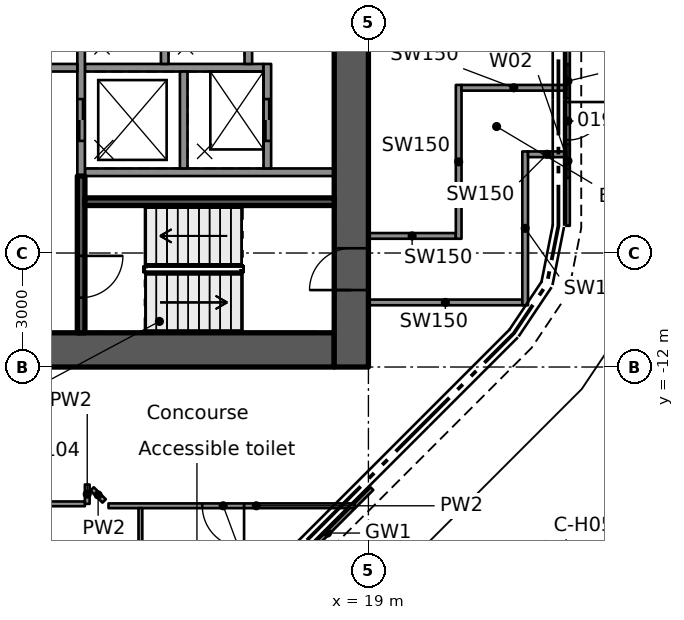
"""IFC4 building model, lengths in metres.
Left out: names, types, materials, properties, quantities, classifications, styles, units other than length and angle.
Written with IfcOpenShell. Run it as: python <this file> out.ifc"""

import sys

from ifc_helpers import new_model, si_unit, direction, frame, frame_2d, origin, place, context, subcontext, project, spatial, rectangle, extrude, element, fill, save


model = new_model("IFC4")
c1 = context("Model", 3, precision=1e-05, world=origin(), true_north=direction((0.0, 1.0)))
c2 = subcontext(c1, "Body", "Model", "MODEL_VIEW")
j1 = project(units=[si_unit("LENGTHUNIT", "METRE"), si_unit("PLANEANGLEUNIT", "RADIAN")], contexts=[c1])
p1 = place(None, origin())
s1 = spatial("IfcSite", under=j1, at=p1, CompositionType="ELEMENT")
p2 = place(p1, origin())
s2 = spatial("IfcBuilding", under=s1, at=p2, CompositionType="ELEMENT")
p3 = place(p2, origin())
s3 = spatial("IfcBuildingStorey", under=s2, at=p3, CompositionType="ELEMENT", Elevation=0.0)
p4 = place(p3, frame((8.9, -11.55, -0.5), z_axis=(0.0, 0.0, 1.0), x_axis=(1.0, 0.0, 0.0)))
e1 = element("IfcWall", 1, at=p4, inside=s3, PredefinedType="SHEAR", context=c2, shape_type="SweptSolid", body=[
    extrude(rectangle(XDim=9.2, YDim=0.9, at=frame_2d((4.6, 0.0))), origin(), (0.0, 0.0, 1.0), 11.0),
])
p5 = place(p3, frame((18.55, -12.0, -0.5), z_axis=(0.0, 0.0, 1.0), x_axis=(0.0, 1.0, 0.0)))
e2 = element("IfcWall", 2, at=p5, inside=s3, PredefinedType="SHEAR", context=c2, shape_type="SweptSolid", body=[
    extrude(rectangle(XDim=24.0, YDim=0.9, at=frame_2d((12.0, 0.0))), origin(), (0.0, 0.0, 1.0), 11.0),
])
p6 = place(p5, frame((12.1, 0.0, 0.5)))
e3 = element("IfcOpeningElement", 3, at=p6, cuts=e2, PredefinedType="OPENING", context=c2, shape_type="SweptSolid", body=[
    extrude(rectangle(XDim=1.8, YDim=2.1, at=frame_2d((0.9, 1.05))), frame((0.0, 0.46, 0.0), z_axis=(0.0, -1.0, 0.0), x_axis=(1.0, 0.0, 0.0)), (0.0, 0.0, 1.0), 0.92),
])
p7 = place(p5, frame((2.025, 0.0, 0.5)))
e4 = element("IfcOpeningElement", 4, at=p7, cuts=e2, PredefinedType="OPENING", context=c2, shape_type="SweptSolid", body=[
    extrude(rectangle(XDim=1.1, YDim=2.1, at=frame_2d((0.55, 1.05))), frame((0.0, 0.46, 0.0), z_axis=(0.0, -1.0, 0.0), x_axis=(1.0, 0.0, 0.0)), (0.0, 0.0, 1.0), 0.92),
])
p8 = place(p3, frame((11.54, -6.875, 0.0), z_axis=(0.0, 0.0, 1.0), x_axis=(1.0, 0.0, 0.0)))
e5 = element("IfcWall", 5, at=p8, inside=s3, PredefinedType="SOLIDWALL", context=c2, shape_type="SweptSolid", body=[
    extrude(rectangle(XDim=6.56, YDim=0.2, at=frame_2d((3.28, 0.0))), origin(), (0.0, 0.0, 1.0), 10.09),
])
p9 = place(p3, frame((11.54, -4.125, 0.0), z_axis=(0.0, 0.0, 1.0), x_axis=(1.0, 0.0, 0.0)))
e6 = element("IfcWall", 6, at=p9, inside=s3, PredefinedType="SOLIDWALL", context=c2, shape_type="SweptSolid", body=[
    extrude(rectangle(XDim=4.7, YDim=0.2, at=frame_2d((2.35, 0.0))), origin(), (0.0, 0.0, 1.0), 10.09),
])
p10 = place(p3, frame((11.44, 6.975, 0.0), z_axis=(0.0, 0.0, 1.0), x_axis=(0.0, -1.0, 0.0)))
e7 = element("IfcWall", 7, at=p10, inside=s3, PredefinedType="SOLIDWALL", context=c2, shape_type="SweptSolid", body=[
    extrude(rectangle(XDim=13.95, YDim=0.2, at=frame_2d((6.975, 0.0))), origin(), (0.0, 0.0, 1.0), 10.09),
])
p11 = place(p10, frame((0.925, 0.0, 0.0)))
e8 = element("IfcOpeningElement", 8, at=p11, cuts=e7, PredefinedType="OPENING", context=c2, shape_type="SweptSolid", body=[
    extrude(rectangle(XDim=1.1, YDim=2.1, at=frame_2d((0.55, 1.05))), frame((0.0, 0.11, 0.0), z_axis=(0.0, -1.0, 0.0), x_axis=(1.0, 0.0, 0.0)), (0.0, 0.0, 1.0), 0.22),
])
p12 = place(p10, frame((3.675, 0.0, 0.0)))
e9 = element("IfcOpeningElement", 9, at=p12, cuts=e7, PredefinedType="OPENING", context=c2, shape_type="SweptSolid", body=[
    extrude(rectangle(XDim=1.1, YDim=2.1, at=frame_2d((0.55, 1.05))), frame((0.0, 0.11, 0.0), z_axis=(0.0, -1.0, 0.0), x_axis=(1.0, 0.0, 0.0)), (0.0, 0.0, 1.0), 0.22),
])
p13 = place(p10, frame((6.425, 0.0, 0.0)))
e10 = element("IfcOpeningElement", 10, at=p13, cuts=e7, PredefinedType="OPENING", context=c2, shape_type="SweptSolid", body=[
    extrude(rectangle(XDim=1.1, YDim=2.1, at=frame_2d((0.55, 1.05))), frame((0.0, 0.11, 0.0), z_axis=(0.0, -1.0, 0.0), x_axis=(1.0, 0.0, 0.0)), (0.0, 0.0, 1.0), 0.22),
])
p14 = place(p10, frame((9.175, 0.0, 0.0)))
e11 = element("IfcOpeningElement", 11, at=p14, cuts=e7, PredefinedType="OPENING", context=c2, shape_type="SweptSolid", body=[
    extrude(rectangle(XDim=1.1, YDim=2.1, at=frame_2d((0.55, 1.05))), frame((0.0, 0.11, 0.0), z_axis=(0.0, -1.0, 0.0), x_axis=(1.0, 0.0, 0.0)), (0.0, 0.0, 1.0), 0.22),
])
p15 = place(p10, frame((11.925, 0.0, 0.0)))
e12 = element("IfcOpeningElement", 12, at=p15, cuts=e7, PredefinedType="OPENING", context=c2, shape_type="SweptSolid", body=[
    extrude(rectangle(XDim=1.1, YDim=2.1, at=frame_2d((0.55, 1.05))), frame((0.0, 0.11, 0.0), z_axis=(0.0, -1.0, 0.0), x_axis=(1.0, 0.0, 0.0)), (0.0, 0.0, 1.0), 0.22),
])
for number, where, z_axis, x_axis in (
    (13, (13.64, -1.475, 0.0), (0.0, 0.0, 1.0), (0.0, -1.0, 0.0)),
    (14, (14.14, -4.225, 0.0), (0.0, 0.0, 1.0), (0.0, -1.0, 0.0)),
):
    element("IfcWall", number, at=place(p3, frame(where, z_axis=z_axis, x_axis=x_axis)), inside=s3, PredefinedType="SOLIDWALL", context=c2, shape_type="SweptSolid", body=[
        extrude(rectangle(XDim=2.55, YDim=0.2, at=frame_2d((1.275, 0.0))), origin(), (0.0, 0.0, 1.0), 10.09),
    ])
p16 = place(p3, frame((15.84, 4.025, 0.0), z_axis=(0.0, 0.0, 1.0), x_axis=(0.0, -1.0, 0.0)))
e15 = element("IfcWall", 15, at=p16, inside=s3, PredefinedType="SOLIDWALL", context=c2, shape_type="SweptSolid", body=[
    extrude(rectangle(XDim=8.05, YDim=0.2, at=frame_2d((4.025, 0.0))), origin(), (0.0, 0.0, 1.0), 10.09),
])
p17 = place(p16, frame((0.725, 0.0, 0.0)))
e16 = element("IfcOpeningElement", 16, at=p17, cuts=e15, PredefinedType="OPENING", context=c2, shape_type="SweptSolid", body=[
    extrude(rectangle(XDim=1.1, YDim=2.1, at=frame_2d((0.55, 1.05))), frame((0.0, 0.11, 0.0), z_axis=(0.0, -1.0, 0.0), x_axis=(1.0, 0.0, 0.0)), (0.0, 0.0, 1.0), 0.22),
])
p18 = place(p16, frame((3.475, 0.0, 0.0)))
e17 = element("IfcOpeningElement", 17, at=p18, cuts=e15, PredefinedType="OPENING", context=c2, shape_type="SweptSolid", body=[
    extrude(rectangle(XDim=1.1, YDim=2.1, at=frame_2d((0.55, 1.05))), frame((0.0, 0.11, 0.0), z_axis=(0.0, -1.0, 0.0), x_axis=(1.0, 0.0, 0.0)), (0.0, 0.0, 1.0), 0.22),
])
p19 = place(p16, frame((6.225, 0.0, 0.0)))
e18 = element("IfcOpeningElement", 18, at=p19, cuts=e15, PredefinedType="OPENING", context=c2, shape_type="SweptSolid", body=[
    extrude(rectangle(XDim=1.1, YDim=2.1, at=frame_2d((0.55, 1.05))), frame((0.0, 0.11, 0.0), z_axis=(0.0, -1.0, 0.0), x_axis=(1.0, 0.0, 0.0)), (0.0, 0.0, 1.0), 0.22),
])
p20 = place(p3, frame((16.34, -4.025, 0.0), z_axis=(0.0, 0.0, 1.0), x_axis=(0.0, -1.0, 0.0)))
e19 = element("IfcWall", 19, at=p20, inside=s3, PredefinedType="SOLIDWALL", context=c2, shape_type="SweptSolid", body=[
    extrude(rectangle(XDim=2.75, YDim=0.2, at=frame_2d((1.375, 0.0))), origin(), (0.0, 0.0, 1.0), 10.09),
])
p21 = place(p20, frame((0.925, 0.0, 0.0)))
e20 = element("IfcOpeningElement", 20, at=p21, cuts=e19, PredefinedType="OPENING", context=c2, shape_type="SweptSolid", body=[
    extrude(rectangle(XDim=1.1, YDim=2.1, at=frame_2d((0.55, 1.05))), frame((0.0, 0.11, 0.0), z_axis=(0.0, -1.0, 0.0), x_axis=(1.0, 0.0, 0.0)), (0.0, 0.0, 1.0), 0.22),
])
p22 = place(p3, frame((11.44, -6.975, 0.0), z_axis=(0.0, 0.0, 1.0), x_axis=(0.0, -1.0, 0.0)))
e21 = element("IfcWall", 21, at=p22, inside=s3, PredefinedType="SOLIDWALL", context=c2, shape_type="SweptSolid", body=[
    extrude(rectangle(XDim=4.125, YDim=0.2, at=frame_2d((2.062, 0.0))), origin(), (0.0, 0.0, 1.0), 10.09),
])
p23 = place(p22, frame((2.1, 0.0, 0.0)))
e22 = element("IfcOpeningElement", 22, at=p23, cuts=e21, PredefinedType="OPENING", context=c2, shape_type="SweptSolid", body=[
    extrude(rectangle(XDim=1.1, YDim=2.1, at=frame_2d((0.55, 1.05))), frame((0.0, 0.11, 0.0), z_axis=(0.0, -1.0, 0.0), x_axis=(1.0, 0.0, 0.0)), (0.0, 0.0, 1.0), 0.22),
])
p24 = place(p3, frame((11.54, -7.65, 0.0), z_axis=(0.0, 0.0, 1.0), x_axis=(1.0, 0.0, 0.0)))
e23 = element("IfcWall", 23, at=p24, inside=s3, PredefinedType="SOLIDWALL", context=c2, shape_type="SweptSolid", body=[
    extrude(rectangle(XDim=6.56, YDim=0.2, at=frame_2d((3.28, 0.0))), origin(), (0.0, 0.0, 1.0), 10.09),
])
p25 = place(p3, frame((8.9, -4.125, 0.0), z_axis=(0.0, 0.0, 1.0), x_axis=(1.0, 0.0, 0.0)))
e24 = element("IfcWall", 24, at=p25, inside=s3, PredefinedType="PARTITIONING", context=c2, shape_type="SweptSolid", body=[
    extrude(rectangle(XDim=2.44, YDim=0.2, at=frame_2d((1.22, 0.0))), origin(), (0.0, 0.0, 1.0), 10.09),
])
p26 = place(p3, frame((24.25, -2.771, -0.4), z_axis=(0.0, 0.0, 1.0), x_axis=(0.0, -1.0, 0.0)))
e25 = element("IfcWall", 25, at=p26, inside=s3, PredefinedType="STANDARD", context=c2, shape_type="SweptSolid", body=[
    extrude(rectangle(XDim=5.513, YDim=0.1, at=frame_2d((2.757, 0.0))), origin(), (0.0, 0.0, 1.0), 10.5),
])
p27 = place(p26, frame((2.257, 0.0, 0.4)))
e26 = element("IfcOpeningElement", 26, at=p27, cuts=e25, PredefinedType="OPENING", context=c2, shape_type="SweptSolid", body=[
    extrude(rectangle(XDim=1.0, YDim=2.4, at=frame_2d((0.5, 1.2))), frame((0.0, 0.06, 0.0), z_axis=(0.0, -1.0, 0.0), x_axis=(1.0, 0.0, 0.0)), (0.0, 0.0, 1.0), 0.12),
])
p28 = place(p26, frame((1.257, 0.0, 0.4)))
e27 = element("IfcOpeningElement", 27, at=p28, cuts=e25, PredefinedType="OPENING", context=c2, shape_type="SweptSolid", body=[
    extrude(rectangle(XDim=0.9, YDim=2.4, at=frame_2d((0.45, 1.2))), frame((0.0, 0.06, 0.0), z_axis=(0.0, -1.0, 0.0), x_axis=(1.0, 0.0, 0.0)), (0.0, 0.0, 1.0), 0.12),
])
p29 = place(p26, frame((3.357, 0.0, 0.4)))
e28 = element("IfcOpeningElement", 28, at=p29, cuts=e25, PredefinedType="OPENING", context=c2, shape_type="SweptSolid", body=[
    extrude(rectangle(XDim=0.9, YDim=2.4, at=frame_2d((0.45, 1.2))), frame((0.0, 0.06, 0.0), z_axis=(0.0, -1.0, 0.0), x_axis=(1.0, 0.0, 0.0)), (0.0, 0.0, 1.0), 0.12),
])
p30 = place(p3, frame((19.093, -15.201, -0.4), z_axis=(0.0, 0.0, 1.0), x_axis=(-0.707106781187, -0.707106781187, 0.0)))
e29 = element("IfcWall", 29, at=p30, inside=s3, PredefinedType="STANDARD", context=c2, shape_type="SweptSolid", body=[
    extrude(rectangle(XDim=5.504, YDim=0.1, at=frame_2d((2.752, 0.0))), origin(), (0.0, 0.0, 1.0), 10.5),
])
p31 = place(p30, frame((2.152, 0.0, 0.4)))
e30 = element("IfcOpeningElement", 30, at=p31, cuts=e29, PredefinedType="OPENING", context=c2, shape_type="SweptSolid", body=[
    extrude(rectangle(XDim=1.2, YDim=2.2, at=frame_2d((0.6, 1.1))), frame((0.0, 0.06, 0.0), z_axis=(0.0, -1.0, 0.0), x_axis=(1.0, 0.0, 0.0)), (0.0, 0.0, 1.0), 0.12),
])
p32 = place(p3, frame((19.0, -8.55, 0.0), z_axis=(0.0, 0.0, 1.0), x_axis=(1.0, 0.0, 0.0)))
e31 = element("IfcWall", 31, at=p32, inside=s3, PredefinedType="SOLIDWALL", context=c2, shape_type="SweptSolid", body=[
    extrude(rectangle(XDim=2.3, YDim=0.15, at=frame_2d((1.15, 0.0))), origin(), (0.0, 0.0, 1.0), 10.09),
])
p33 = place(p3, frame((21.375, -8.625, 0.0), z_axis=(0.0, 0.0, 1.0), x_axis=(0.0, 1.0, 0.0)))
e32 = element("IfcWall", 32, at=p33, inside=s3, PredefinedType="SOLIDWALL", context=c2, shape_type="SweptSolid", body=[
    extrude(rectangle(XDim=4.048, YDim=0.15, at=frame_2d((2.024, 0.0))), origin(), (0.0, 0.0, 1.0), 10.09),
])
p34 = place(p3, frame((21.45, -4.652, 0.0), z_axis=(0.0, 0.0, 1.0), x_axis=(1.0, 0.0, 0.0)))
e33 = element("IfcWall", 33, at=p34, inside=s3, PredefinedType="SOLIDWALL", context=c2, shape_type="SweptSolid", body=[
    extrude(rectangle(XDim=2.75, YDim=0.15, at=frame_2d((1.375, 0.0))), origin(), (0.0, 0.0, 1.0), 10.09),
])
p35 = place(p3, frame((19.0, -10.3, 0.0), z_axis=(0.0, 0.0, 1.0), x_axis=(1.0, 0.0, 0.0)))
e34 = element("IfcWall", 34, at=p35, inside=s3, PredefinedType="SOLIDWALL", context=c2, shape_type="SweptSolid", body=[
    extrude(rectangle(XDim=4.05, YDim=0.15, at=frame_2d((2.025, 0.0))), origin(), (0.0, 0.0, 1.0), 10.09),
])
p36 = place(p3, frame((23.125, -10.375, 0.0), z_axis=(0.0, 0.0, 1.0), x_axis=(0.0, 1.0, 0.0)))
e35 = element("IfcWall", 35, at=p36, inside=s3, PredefinedType="SOLIDWALL", context=c2, shape_type="SweptSolid", body=[
    extrude(rectangle(XDim=4.048, YDim=0.15, at=frame_2d((2.024, 0.0))), origin(), (0.0, 0.0, 1.0), 10.09),
])
p37 = place(p3, frame((23.2, -6.402, 0.0), z_axis=(0.0, 0.0, 1.0), x_axis=(1.0, 0.0, 0.0)))
e36 = element("IfcWall", 36, at=p37, inside=s3, PredefinedType="SOLIDWALL", context=c2, shape_type="SweptSolid", body=[
    extrude(rectangle(XDim=1.0, YDim=0.15, at=frame_2d((0.5, 0.0))), origin(), (0.0, 0.0, 1.0), 10.09),
])
p38 = place(p3, frame((11.729, -15.207, 0.0), z_axis=(0.0, 0.0, 1.0), x_axis=(0.707106781187, -0.707106781187, 0.0)))
e37 = element("IfcWall", 37, at=p38, inside=s3, PredefinedType="PARTITIONING", context=c2, shape_type="SweptSolid", body=[
    extrude(rectangle(XDim=0.448, YDim=0.125, at=frame_2d((0.224, 0.0))), origin(), (0.0, 0.0, 1.0), 10.1),
])
p39 = place(p3, frame((18.642, -15.651, 0.0), z_axis=(0.0, 0.0, 1.0), x_axis=(-1.0, 0.0, 0.0)))
e38 = element("IfcWall", 38, at=p39, inside=s3, PredefinedType="PARTITIONING", context=c2, shape_type="SweptSolid", body=[
    extrude(rectangle(XDim=6.482, YDim=0.125, at=frame_2d((3.241, 0.0))), origin(), (0.0, 0.0, 1.0), 10.1),
])
p40 = place(p39, frame((2.914, 0.0, 0.0)))
e39 = element("IfcOpeningElement", 39, at=p40, cuts=e38, PredefinedType="OPENING", context=c2, shape_type="SweptSolid", body=[
    extrude(rectangle(XDim=1.1, YDim=2.1, at=frame_2d((0.55, 1.05))), frame((0.0, 0.073, 0.0), z_axis=(0.0, -1.0, 0.0), x_axis=(1.0, 0.0, 0.0)), (0.0, 0.0, 1.0), 0.145),
])
p41 = place(p3, frame((11.539, -15.6, 0.0), z_axis=(0.0, 0.0, 1.0), x_axis=(-1.0, 0.0, 0.0)))
e40 = element("IfcWall", 40, at=p41, inside=s3, PredefinedType="PARTITIONING", context=c2, shape_type="SweptSolid", body=[
    extrude(rectangle(XDim=3.439, YDim=0.125, at=frame_2d((1.719, 0.0))), origin(), (0.0, 0.0, 1.0), 10.1),
])
p42 = place(p41, frame((1.288, 0.0, 0.0)))
e41 = element("IfcOpeningElement", 41, at=p42, cuts=e40, PredefinedType="OPENING", context=c2, shape_type="SweptSolid", body=[
    extrude(rectangle(XDim=0.9, YDim=2.1, at=frame_2d((0.45, 1.05))), frame((0.0, 0.073, 0.0), z_axis=(0.0, -1.0, 0.0), x_axis=(1.0, 0.0, 0.0)), (0.0, 0.0, 1.0), 0.145),
])
p43 = place(p3, frame((13.0, -21.093, 0.0), z_axis=(0.0, 0.0, 1.0), x_axis=(0.0, 1.0, 0.0)))
e42 = element("IfcWall", 42, at=p43, inside=s3, PredefinedType="PARTITIONING", context=c2, shape_type="SweptSolid", body=[
    extrude(rectangle(XDim=5.38, YDim=0.1, at=frame_2d((2.69, 0.0))), origin(), (0.0, 0.0, 1.0), 10.1),
])
p44 = place(p3, frame((11.601, -15.6, 0.0), z_axis=(0.0, 0.0, 1.0), x_axis=(0.0, 1.0, 0.0)))
e43 = element("IfcWall", 43, at=p44, inside=s3, PredefinedType="PARTITIONING", context=c2, shape_type="SweptSolid", body=[
    extrude(rectangle(XDim=0.508, YDim=0.125, at=frame_2d((0.254, 0.0))), origin(), (0.0, 0.0, 1.0), 10.1),
])
p45 = place(p15, origin())
e44 = element("IfcDoor", 44, at=p45, inside=s3, OperationType="DOUBLE_DOOR_SLIDING", PredefinedType="DOOR", context=c2, shape_type="SweptSolid", body=[
    extrude(rectangle(XDim=1.1, YDim=2.1, at=frame_2d((0.55, 1.05))), frame((0.0, 0.025, 0.0), z_axis=(0.0, -1.0, 0.0), x_axis=(1.0, 0.0, 0.0)), (0.0, 0.0, 1.0), 0.05),
])
fill(e12, e44)
p46 = place(p21, origin())
e45 = element("IfcDoor", 45, at=p46, inside=s3, OperationType="DOUBLE_DOOR_SLIDING", PredefinedType="DOOR", context=c2, shape_type="SweptSolid", body=[
    extrude(rectangle(XDim=1.1, YDim=2.1, at=frame_2d((0.55, 1.05))), frame((0.0, 0.025, 0.0), z_axis=(0.0, -1.0, 0.0), x_axis=(1.0, 0.0, 0.0)), (0.0, 0.0, 1.0), 0.05),
])
fill(e20, e45)
p47 = place(p23, origin())
e46 = element("IfcDoor", 46, at=p47, inside=s3, OperationType="SINGLE_SWING_RIGHT", PredefinedType="DOOR", context=c2, shape_type="SweptSolid", body=[
    extrude(rectangle(XDim=1.1, YDim=2.1, at=frame_2d((0.55, 1.05))), frame((0.0, 0.025, 0.0), z_axis=(0.0, -1.0, 0.0), x_axis=(1.0, 0.0, 0.0)), (0.0, 0.0, 1.0), 0.05),
])
fill(e22, e46)
p48 = place(p27, origin())
e47 = element("IfcDoor", 47, at=p48, inside=s3, OperationType="SINGLE_SWING_LEFT", PredefinedType="DOOR", context=c2, shape_type="SweptSolid", body=[
    extrude(rectangle(XDim=1.0, YDim=2.4, at=frame_2d((0.5, 1.2))), frame((0.0, 0.025, 0.0), z_axis=(0.0, -1.0, 0.0), x_axis=(1.0, 0.0, 0.0)), (0.0, 0.0, 1.0), 0.05),
])
fill(e26, e47)
p49 = place(p28, origin())
e48 = element("IfcWindow", 48, at=p49, inside=s3, PartitioningType="SINGLE_PANEL", PredefinedType="WINDOW", context=c2, shape_type="SweptSolid", body=[
    extrude(rectangle(XDim=0.9, YDim=2.4, at=frame_2d((0.45, 1.2))), frame((0.0, 0.03, 0.0), z_axis=(0.0, -1.0, 0.0), x_axis=(1.0, 0.0, 0.0)), (0.0, 0.0, 1.0), 0.06),
])
fill(e27, e48)
p50 = place(p29, origin())
e49 = element("IfcWindow", 49, at=p50, inside=s3, PartitioningType="SINGLE_PANEL", PredefinedType="WINDOW", context=c2, shape_type="SweptSolid", body=[
    extrude(rectangle(XDim=0.9, YDim=2.4, at=frame_2d((0.45, 1.2))), frame((0.0, 0.03, 0.0), z_axis=(0.0, -1.0, 0.0), x_axis=(1.0, 0.0, 0.0)), (0.0, 0.0, 1.0), 0.06),
])
fill(e28, e49)
p51 = place(p7, origin())
e50 = element("IfcDoor", 50, at=p51, inside=s3, OperationType="SINGLE_SWING_LEFT", PredefinedType="DOOR", context=c2, shape_type="SweptSolid", body=[
    extrude(rectangle(XDim=1.1, YDim=2.1, at=frame_2d((0.55, 1.05))), frame((0.0, 0.025, 0.0), z_axis=(0.0, -1.0, 0.0), x_axis=(1.0, 0.0, 0.0)), (0.0, 0.0, 1.0), 0.05),
])
fill(e4, e50)
p52 = place(p40, origin())
e51 = element("IfcDoor", 51, at=p52, inside=s3, OperationType="SINGLE_SWING_RIGHT", PredefinedType="DOOR", context=c2, shape_type="SweptSolid", body=[
    extrude(rectangle(XDim=1.1, YDim=2.1, at=frame_2d((0.55, 1.05))), frame((0.0, 0.025, 0.0), z_axis=(0.0, -1.0, 0.0), x_axis=(1.0, 0.0, 0.0)), (0.0, 0.0, 1.0), 0.05),
])
fill(e39, e51)
save(model, sys.argv[1])
